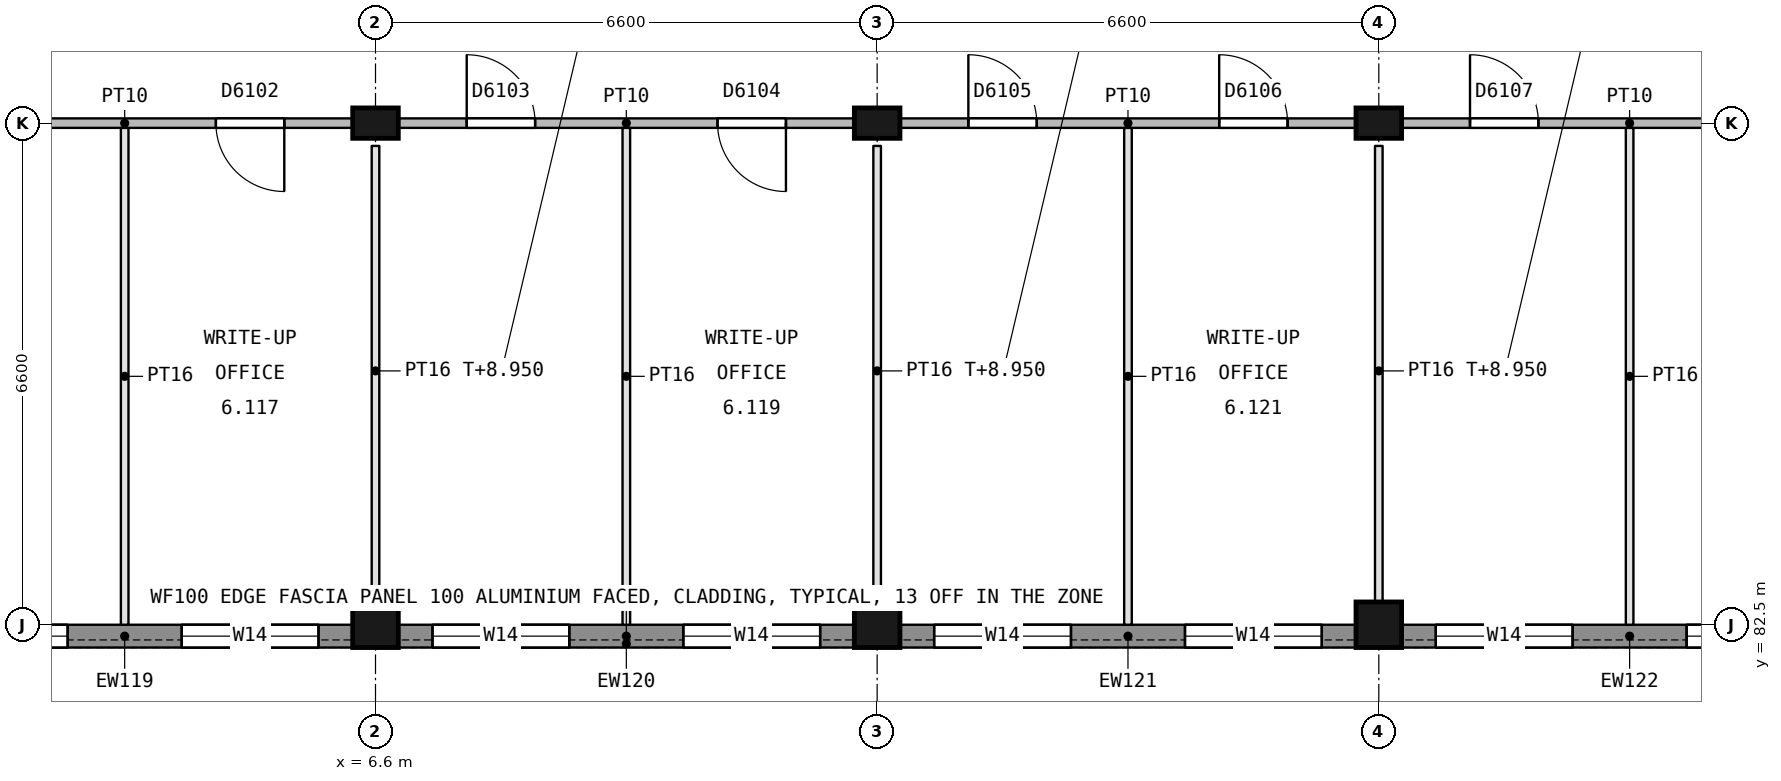
"""IFC4 building model, lengths in metres.
Left out: names, types, materials, properties, quantities, classifications, styles, units other than length and angle.
Written with IfcOpenShell. Run it as: python <this file> out.ifc"""

import sys

from ifc_helpers import new_model, si_unit, direction, frame, frame_2d, origin, origin_2d, place, context, subcontext, project, spatial, rectangle, extrude, element, fill, save


model = new_model("IFC4")
c1 = context("Model", 3, precision=1e-05, world=origin(), true_north=direction((0.0, 1.0)))
c2 = subcontext(c1, "Body", "Model", "MODEL_VIEW")
j1 = project(units=[si_unit("LENGTHUNIT", "METRE"), si_unit("PLANEANGLEUNIT", "RADIAN")], contexts=[c1])
p1 = place(None, origin())
s1 = spatial("IfcSite", under=j1, at=p1, CompositionType="ELEMENT")
p2 = place(p1, origin())
s2 = spatial("IfcBuilding", under=s1, at=p2, CompositionType="ELEMENT")
p3 = place(p2, frame((0.0, 0.0, 5.4)))
s3 = spatial("IfcBuildingStorey", under=s2, at=p3, CompositionType="ELEMENT", Elevation=5.4)
p4 = place(p3, frame((6.6, 82.5, 0.0), z_axis=(0.0, 0.0, 1.0), x_axis=(1.0, 0.0, 0.0)))
e1 = element("IfcColumn", 1, at=p4, inside=s3, PredefinedType="COLUMN", context=c2, shape_type="SweptSolid", body=[
    extrude(rectangle(XDim=0.6, YDim=0.6, at=origin_2d()), origin(), (0.0, 0.0, 1.0), 4.5),
])
p5 = place(p3, frame((6.6, 89.1, 0.0), z_axis=(0.0, 0.0, 1.0), x_axis=(1.0, 0.0, 0.0)))
e2 = element("IfcColumn", 2, at=p5, inside=s3, PredefinedType="COLUMN", context=c2, shape_type="SweptSolid", body=[
    extrude(rectangle(XDim=0.6, YDim=0.4, at=origin_2d()), origin(), (0.0, 0.0, 1.0), 4.5),
])
p6 = place(p3, frame((13.2, 82.5, 0.0), z_axis=(0.0, 0.0, 1.0), x_axis=(1.0, 0.0, 0.0)))
e3 = element("IfcColumn", 3, at=p6, inside=s3, PredefinedType="COLUMN", context=c2, shape_type="SweptSolid", body=[
    extrude(rectangle(XDim=0.6, YDim=0.6, at=origin_2d()), origin(), (0.0, 0.0, 1.0), 4.5),
])
p7 = place(p3, frame((13.2, 89.1, 0.0), z_axis=(0.0, 0.0, 1.0), x_axis=(1.0, 0.0, 0.0)))
e4 = element("IfcColumn", 4, at=p7, inside=s3, PredefinedType="COLUMN", context=c2, shape_type="SweptSolid", body=[
    extrude(rectangle(XDim=0.6, YDim=0.4, at=origin_2d()), origin(), (0.0, 0.0, 1.0), 4.5),
])
p8 = place(p3, frame((19.8, 82.5, 0.0), z_axis=(0.0, 0.0, 1.0), x_axis=(1.0, 0.0, 0.0)))
e5 = element("IfcColumn", 5, at=p8, inside=s3, PredefinedType="COLUMN", context=c2, shape_type="SweptSolid", body=[
    extrude(rectangle(XDim=0.6, YDim=0.6, at=origin_2d()), origin(), (0.0, 0.0, 1.0), 4.5),
])
p9 = place(p3, frame((19.8, 89.1, 0.0), z_axis=(0.0, 0.0, 1.0), x_axis=(1.0, 0.0, 0.0)))
e6 = element("IfcColumn", 6, at=p9, inside=s3, PredefinedType="COLUMN", context=c2, shape_type="SweptSolid", body=[
    extrude(rectangle(XDim=0.6, YDim=0.4, at=origin_2d()), origin(), (0.0, 0.0, 1.0), 4.5),
])
p10 = place(p3, frame((6.3, 82.35, 0.0), z_axis=(0.0, 0.0, 1.0), x_axis=(-1.0, 0.0, 0.0)))
e7 = element("IfcWall", 7, at=p10, inside=s3, PredefinedType="STANDARD", context=c2, shape_type="SweptSolid", body=[
    extrude(rectangle(XDim=6.0, YDim=0.3, at=frame_2d((3.0, 0.0))), origin(), (0.0, 0.0, 1.0), 3.65),
])
p11 = place(p10, frame((3.75, 0.0, 0.9)))
e8 = element("IfcOpeningElement", 8, at=p11, cuts=e7, PredefinedType="OPENING", context=c2, shape_type="SweptSolid", body=[
    extrude(rectangle(XDim=1.8, YDim=1.5, at=frame_2d((0.9, 0.75))), frame((0.0, 0.16, 0.0), z_axis=(0.0, -1.0, 0.0), x_axis=(1.0, 0.0, 0.0)), (0.0, 0.0, 1.0), 0.32),
])
p12 = place(p10, frame((0.45, 0.0, 0.9)))
e9 = element("IfcOpeningElement", 9, at=p12, cuts=e7, PredefinedType="OPENING", context=c2, shape_type="SweptSolid", body=[
    extrude(rectangle(XDim=1.8, YDim=1.5, at=frame_2d((0.9, 0.75))), frame((0.0, 0.16, 0.0), z_axis=(0.0, -1.0, 0.0), x_axis=(1.0, 0.0, 0.0)), (0.0, 0.0, 1.0), 0.32),
])
p13 = place(p3, frame((12.9, 82.35, 0.0), z_axis=(0.0, 0.0, 1.0), x_axis=(-1.0, 0.0, 0.0)))
e10 = element("IfcWall", 10, at=p13, inside=s3, PredefinedType="STANDARD", context=c2, shape_type="SweptSolid", body=[
    extrude(rectangle(XDim=6.0, YDim=0.3, at=frame_2d((3.0, 0.0))), origin(), (0.0, 0.0, 1.0), 3.65),
])
p14 = place(p13, frame((3.75, 0.0, 0.9)))
e11 = element("IfcOpeningElement", 11, at=p14, cuts=e10, PredefinedType="OPENING", context=c2, shape_type="SweptSolid", body=[
    extrude(rectangle(XDim=1.8, YDim=1.5, at=frame_2d((0.9, 0.75))), frame((0.0, 0.16, 0.0), z_axis=(0.0, -1.0, 0.0), x_axis=(1.0, 0.0, 0.0)), (0.0, 0.0, 1.0), 0.32),
])
p15 = place(p13, frame((0.45, 0.0, 0.9)))
e12 = element("IfcOpeningElement", 12, at=p15, cuts=e10, PredefinedType="OPENING", context=c2, shape_type="SweptSolid", body=[
    extrude(rectangle(XDim=1.8, YDim=1.5, at=frame_2d((0.9, 0.75))), frame((0.0, 0.16, 0.0), z_axis=(0.0, -1.0, 0.0), x_axis=(1.0, 0.0, 0.0)), (0.0, 0.0, 1.0), 0.32),
])
p16 = place(p3, frame((19.5, 82.35, 0.0), z_axis=(0.0, 0.0, 1.0), x_axis=(-1.0, 0.0, 0.0)))
e13 = element("IfcWall", 13, at=p16, inside=s3, PredefinedType="STANDARD", context=c2, shape_type="SweptSolid", body=[
    extrude(rectangle(XDim=6.0, YDim=0.3, at=frame_2d((3.0, 0.0))), origin(), (0.0, 0.0, 1.0), 3.65),
])
p17 = place(p16, frame((3.75, 0.0, 0.9)))
e14 = element("IfcOpeningElement", 14, at=p17, cuts=e13, PredefinedType="OPENING", context=c2, shape_type="SweptSolid", body=[
    extrude(rectangle(XDim=1.8, YDim=1.5, at=frame_2d((0.9, 0.75))), frame((0.0, 0.16, 0.0), z_axis=(0.0, -1.0, 0.0), x_axis=(1.0, 0.0, 0.0)), (0.0, 0.0, 1.0), 0.32),
])
p18 = place(p16, frame((0.45, 0.0, 0.9)))
e15 = element("IfcOpeningElement", 15, at=p18, cuts=e13, PredefinedType="OPENING", context=c2, shape_type="SweptSolid", body=[
    extrude(rectangle(XDim=1.8, YDim=1.5, at=frame_2d((0.9, 0.75))), frame((0.0, 0.16, 0.0), z_axis=(0.0, -1.0, 0.0), x_axis=(1.0, 0.0, 0.0)), (0.0, 0.0, 1.0), 0.32),
])
p19 = place(p3, frame((26.1, 82.35, 0.0), z_axis=(0.0, 0.0, 1.0), x_axis=(-1.0, 0.0, 0.0)))
e16 = element("IfcWall", 16, at=p19, inside=s3, PredefinedType="STANDARD", context=c2, shape_type="SweptSolid", body=[
    extrude(rectangle(XDim=6.0, YDim=0.3, at=frame_2d((3.0, 0.0))), origin(), (0.0, 0.0, 1.0), 3.65),
])
p20 = place(p19, frame((3.75, 0.0, 0.9)))
e17 = element("IfcOpeningElement", 17, at=p20, cuts=e16, PredefinedType="OPENING", context=c2, shape_type="SweptSolid", body=[
    extrude(rectangle(XDim=1.8, YDim=1.5, at=frame_2d((0.9, 0.75))), frame((0.0, 0.16, 0.0), z_axis=(0.0, -1.0, 0.0), x_axis=(1.0, 0.0, 0.0)), (0.0, 0.0, 1.0), 0.32),
])
p21 = place(p19, frame((0.45, 0.0, 0.9)))
e18 = element("IfcOpeningElement", 18, at=p21, cuts=e16, PredefinedType="OPENING", context=c2, shape_type="SweptSolid", body=[
    extrude(rectangle(XDim=1.8, YDim=1.5, at=frame_2d((0.9, 0.75))), frame((0.0, 0.16, 0.0), z_axis=(0.0, -1.0, 0.0), x_axis=(1.0, 0.0, 0.0)), (0.0, 0.0, 1.0), 0.32),
])
p22 = place(p3, frame((6.3, 89.1, 0.0), z_axis=(0.0, 0.0, 1.0), x_axis=(-1.0, 0.0, 0.0)))
e19 = element("IfcWall", 19, at=p22, inside=s3, PredefinedType="PARTITIONING", context=c2, shape_type="SweptSolid", body=[
    extrude(rectangle(XDim=6.0, YDim=0.125, at=frame_2d((3.0, 0.0))), origin(), (0.0, 0.0, 1.0), 3.65),
])
p23 = place(p22, frame((4.2, 0.0, 0.0)))
e20 = element("IfcOpeningElement", 20, at=p23, cuts=e19, PredefinedType="OPENING", context=c2, shape_type="SweptSolid", body=[
    extrude(rectangle(XDim=0.9, YDim=2.1, at=frame_2d((0.45, 1.05))), frame((0.0, 0.073, 0.0), z_axis=(0.0, -1.0, 0.0), x_axis=(1.0, 0.0, 0.0)), (0.0, 0.0, 1.0), 0.145),
])
p24 = place(p22, frame((0.9, 0.0, 0.0)))
e21 = element("IfcOpeningElement", 21, at=p24, cuts=e19, PredefinedType="OPENING", context=c2, shape_type="SweptSolid", body=[
    extrude(rectangle(XDim=0.9, YDim=2.1, at=frame_2d((0.45, 1.05))), frame((0.0, 0.073, 0.0), z_axis=(0.0, -1.0, 0.0), x_axis=(1.0, 0.0, 0.0)), (0.0, 0.0, 1.0), 0.145),
])
p25 = place(p3, frame((12.9, 89.1, 0.0), z_axis=(0.0, 0.0, 1.0), x_axis=(-1.0, 0.0, 0.0)))
e22 = element("IfcWall", 22, at=p25, inside=s3, PredefinedType="PARTITIONING", context=c2, shape_type="SweptSolid", body=[
    extrude(rectangle(XDim=6.0, YDim=0.125, at=frame_2d((3.0, 0.0))), origin(), (0.0, 0.0, 1.0), 3.65),
])
p26 = place(p25, frame((4.2, 0.0, 0.0)))
e23 = element("IfcOpeningElement", 23, at=p26, cuts=e22, PredefinedType="OPENING", context=c2, shape_type="SweptSolid", body=[
    extrude(rectangle(XDim=0.9, YDim=2.1, at=frame_2d((0.45, 1.05))), frame((0.0, 0.073, 0.0), z_axis=(0.0, -1.0, 0.0), x_axis=(1.0, 0.0, 0.0)), (0.0, 0.0, 1.0), 0.145),
])
p27 = place(p25, frame((0.9, 0.0, 0.0)))
e24 = element("IfcOpeningElement", 24, at=p27, cuts=e22, PredefinedType="OPENING", context=c2, shape_type="SweptSolid", body=[
    extrude(rectangle(XDim=0.9, YDim=2.1, at=frame_2d((0.45, 1.05))), frame((0.0, 0.073, 0.0), z_axis=(0.0, -1.0, 0.0), x_axis=(1.0, 0.0, 0.0)), (0.0, 0.0, 1.0), 0.145),
])
p28 = place(p3, frame((19.5, 89.1, 0.0), z_axis=(0.0, 0.0, 1.0), x_axis=(-1.0, 0.0, 0.0)))
e25 = element("IfcWall", 25, at=p28, inside=s3, PredefinedType="PARTITIONING", context=c2, shape_type="SweptSolid", body=[
    extrude(rectangle(XDim=6.0, YDim=0.125, at=frame_2d((3.0, 0.0))), origin(), (0.0, 0.0, 1.0), 3.65),
])
p29 = place(p28, frame((4.2, 0.0, 0.0)))
e26 = element("IfcOpeningElement", 26, at=p29, cuts=e25, PredefinedType="OPENING", context=c2, shape_type="SweptSolid", body=[
    extrude(rectangle(XDim=0.9, YDim=2.1, at=frame_2d((0.45, 1.05))), frame((0.0, 0.073, 0.0), z_axis=(0.0, -1.0, 0.0), x_axis=(1.0, 0.0, 0.0)), (0.0, 0.0, 1.0), 0.145),
])
p30 = place(p28, frame((0.9, 0.0, 0.0)))
e27 = element("IfcOpeningElement", 27, at=p30, cuts=e25, PredefinedType="OPENING", context=c2, shape_type="SweptSolid", body=[
    extrude(rectangle(XDim=0.9, YDim=2.1, at=frame_2d((0.45, 1.05))), frame((0.0, 0.073, 0.0), z_axis=(0.0, -1.0, 0.0), x_axis=(1.0, 0.0, 0.0)), (0.0, 0.0, 1.0), 0.145),
])
p31 = place(p3, frame((26.1, 89.1, 0.0), z_axis=(0.0, 0.0, 1.0), x_axis=(-1.0, 0.0, 0.0)))
e28 = element("IfcWall", 28, at=p31, inside=s3, PredefinedType="PARTITIONING", context=c2, shape_type="SweptSolid", body=[
    extrude(rectangle(XDim=6.0, YDim=0.125, at=frame_2d((3.0, 0.0))), origin(), (0.0, 0.0, 1.0), 3.65),
])
p32 = place(p31, frame((4.2, 0.0, 0.0)))
e29 = element("IfcOpeningElement", 29, at=p32, cuts=e28, PredefinedType="OPENING", context=c2, shape_type="SweptSolid", body=[
    extrude(rectangle(XDim=0.9, YDim=2.1, at=frame_2d((0.45, 1.05))), frame((0.0, 0.073, 0.0), z_axis=(0.0, -1.0, 0.0), x_axis=(1.0, 0.0, 0.0)), (0.0, 0.0, 1.0), 0.145),
])
p33 = place(p31, frame((0.9, 0.0, 0.0)))
e30 = element("IfcOpeningElement", 30, at=p33, cuts=e28, PredefinedType="OPENING", context=c2, shape_type="SweptSolid", body=[
    extrude(rectangle(XDim=0.9, YDim=2.1, at=frame_2d((0.45, 1.05))), frame((0.0, 0.073, 0.0), z_axis=(0.0, -1.0, 0.0), x_axis=(1.0, 0.0, 0.0)), (0.0, 0.0, 1.0), 0.145),
])
p34 = place(p3, frame((3.3, 82.5, 0.0), z_axis=(0.0, 0.0, 1.0), x_axis=(0.0, 1.0, 0.0)))
e31 = element("IfcWall", 31, at=p34, inside=s3, PredefinedType="PARTITIONING", context=c2, shape_type="SweptSolid", body=[
    extrude(rectangle(XDim=6.537, YDim=0.1, at=frame_2d((3.269, 0.0))), origin(), (0.0, 0.0, 1.0), 3.65),
])
p35 = place(p3, frame((6.6, 82.8, 0.0), z_axis=(0.0, 0.0, 1.0), x_axis=(0.0, 1.0, 0.0)))
e32 = element("IfcWall", 32, at=p35, inside=s3, PredefinedType="PARTITIONING", context=c2, shape_type="SweptSolid", body=[
    extrude(rectangle(XDim=6.0, YDim=0.1, at=frame_2d((3.0, 0.0))), origin(), (0.0, 0.0, 1.0), 3.55),
])
p36 = place(p3, frame((9.9, 82.5, 0.0), z_axis=(0.0, 0.0, 1.0), x_axis=(0.0, 1.0, 0.0)))
e33 = element("IfcWall", 33, at=p36, inside=s3, PredefinedType="PARTITIONING", context=c2, shape_type="SweptSolid", body=[
    extrude(rectangle(XDim=6.537, YDim=0.1, at=frame_2d((3.269, 0.0))), origin(), (0.0, 0.0, 1.0), 3.65),
])
p37 = place(p3, frame((13.2, 82.8, 0.0), z_axis=(0.0, 0.0, 1.0), x_axis=(0.0, 1.0, 0.0)))
e34 = element("IfcWall", 34, at=p37, inside=s3, PredefinedType="PARTITIONING", context=c2, shape_type="SweptSolid", body=[
    extrude(rectangle(XDim=6.0, YDim=0.1, at=frame_2d((3.0, 0.0))), origin(), (0.0, 0.0, 1.0), 3.55),
])
p38 = place(p3, frame((16.5, 82.5, 0.0), z_axis=(0.0, 0.0, 1.0), x_axis=(0.0, 1.0, 0.0)))
e35 = element("IfcWall", 35, at=p38, inside=s3, PredefinedType="PARTITIONING", context=c2, shape_type="SweptSolid", body=[
    extrude(rectangle(XDim=6.537, YDim=0.1, at=frame_2d((3.269, 0.0))), origin(), (0.0, 0.0, 1.0), 3.65),
])
p39 = place(p3, frame((19.8, 82.8, 0.0), z_axis=(0.0, 0.0, 1.0), x_axis=(0.0, 1.0, 0.0)))
e36 = element("IfcWall", 36, at=p39, inside=s3, PredefinedType="PARTITIONING", context=c2, shape_type="SweptSolid", body=[
    extrude(rectangle(XDim=6.0, YDim=0.1, at=frame_2d((3.0, 0.0))), origin(), (0.0, 0.0, 1.0), 3.55),
])
p40 = place(p3, frame((23.1, 82.5, 0.0), z_axis=(0.0, 0.0, 1.0), x_axis=(0.0, 1.0, 0.0)))
e37 = element("IfcWall", 37, at=p40, inside=s3, PredefinedType="PARTITIONING", context=c2, shape_type="SweptSolid", body=[
    extrude(rectangle(XDim=6.537, YDim=0.1, at=frame_2d((3.269, 0.0))), origin(), (0.0, 0.0, 1.0), 3.65),
])
p41 = place(p11, origin())
e38 = element("IfcWindow", 38, at=p41, inside=s3, PartitioningType="SINGLE_PANEL", PredefinedType="WINDOW", context=c2, shape_type="SweptSolid", body=[
    extrude(rectangle(XDim=1.8, YDim=1.5, at=frame_2d((0.9, 0.75))), frame((0.0, 0.03, 0.0), z_axis=(0.0, -1.0, 0.0), x_axis=(1.0, 0.0, 0.0)), (0.0, 0.0, 1.0), 0.06),
])
fill(e8, e38)
p42 = place(p12, origin())
e39 = element("IfcWindow", 39, at=p42, inside=s3, PartitioningType="SINGLE_PANEL", PredefinedType="WINDOW", context=c2, shape_type="SweptSolid", body=[
    extrude(rectangle(XDim=1.8, YDim=1.5, at=frame_2d((0.9, 0.75))), frame((0.0, 0.03, 0.0), z_axis=(0.0, -1.0, 0.0), x_axis=(1.0, 0.0, 0.0)), (0.0, 0.0, 1.0), 0.06),
])
fill(e9, e39)
p43 = place(p14, origin())
e40 = element("IfcWindow", 40, at=p43, inside=s3, PartitioningType="SINGLE_PANEL", PredefinedType="WINDOW", context=c2, shape_type="SweptSolid", body=[
    extrude(rectangle(XDim=1.8, YDim=1.5, at=frame_2d((0.9, 0.75))), frame((0.0, 0.03, 0.0), z_axis=(0.0, -1.0, 0.0), x_axis=(1.0, 0.0, 0.0)), (0.0, 0.0, 1.0), 0.06),
])
fill(e11, e40)
p44 = place(p15, origin())
e41 = element("IfcWindow", 41, at=p44, inside=s3, PartitioningType="SINGLE_PANEL", PredefinedType="WINDOW", context=c2, shape_type="SweptSolid", body=[
    extrude(rectangle(XDim=1.8, YDim=1.5, at=frame_2d((0.9, 0.75))), frame((0.0, 0.03, 0.0), z_axis=(0.0, -1.0, 0.0), x_axis=(1.0, 0.0, 0.0)), (0.0, 0.0, 1.0), 0.06),
])
fill(e12, e41)
p45 = place(p17, origin())
e42 = element("IfcWindow", 42, at=p45, inside=s3, PartitioningType="SINGLE_PANEL", PredefinedType="WINDOW", context=c2, shape_type="SweptSolid", body=[
    extrude(rectangle(XDim=1.8, YDim=1.5, at=frame_2d((0.9, 0.75))), frame((0.0, 0.03, 0.0), z_axis=(0.0, -1.0, 0.0), x_axis=(1.0, 0.0, 0.0)), (0.0, 0.0, 1.0), 0.06),
])
fill(e14, e42)
p46 = place(p18, origin())
e43 = element("IfcWindow", 43, at=p46, inside=s3, PartitioningType="SINGLE_PANEL", PredefinedType="WINDOW", context=c2, shape_type="SweptSolid", body=[
    extrude(rectangle(XDim=1.8, YDim=1.5, at=frame_2d((0.9, 0.75))), frame((0.0, 0.03, 0.0), z_axis=(0.0, -1.0, 0.0), x_axis=(1.0, 0.0, 0.0)), (0.0, 0.0, 1.0), 0.06),
])
fill(e15, e43)
p47 = place(p20, origin())
e44 = element("IfcWindow", 44, at=p47, inside=s3, PartitioningType="SINGLE_PANEL", PredefinedType="WINDOW", context=c2, shape_type="SweptSolid", body=[
    extrude(rectangle(XDim=1.8, YDim=1.5, at=frame_2d((0.9, 0.75))), frame((0.0, 0.03, 0.0), z_axis=(0.0, -1.0, 0.0), x_axis=(1.0, 0.0, 0.0)), (0.0, 0.0, 1.0), 0.06),
])
fill(e17, e44)
p48 = place(p21, origin())
e45 = element("IfcWindow", 45, at=p48, inside=s3, PartitioningType="SINGLE_PANEL", PredefinedType="WINDOW", context=c2, shape_type="SweptSolid", body=[
    extrude(rectangle(XDim=1.8, YDim=1.5, at=frame_2d((0.9, 0.75))), frame((0.0, 0.03, 0.0), z_axis=(0.0, -1.0, 0.0), x_axis=(1.0, 0.0, 0.0)), (0.0, 0.0, 1.0), 0.06),
])
fill(e18, e45)
p49 = place(p24, origin())
e46 = element("IfcDoor", 46, at=p49, inside=s3, OperationType="SINGLE_SWING_LEFT", PredefinedType="DOOR", context=c2, shape_type="SweptSolid", body=[
    extrude(rectangle(XDim=0.9, YDim=2.1, at=frame_2d((0.45, 1.05))), frame((0.0, 0.025, 0.0), z_axis=(0.0, -1.0, 0.0), x_axis=(1.0, 0.0, 0.0)), (0.0, 0.0, 1.0), 0.05),
])
fill(e21, e46)
p50 = place(p26, origin())
e47 = element("IfcDoor", 47, at=p50, inside=s3, OperationType="SINGLE_SWING_RIGHT", PredefinedType="DOOR", context=c2, shape_type="SweptSolid", body=[
    extrude(rectangle(XDim=0.9, YDim=2.1, at=frame_2d((0.45, 1.05))), frame((0.0, 0.025, 0.0), z_axis=(0.0, -1.0, 0.0), x_axis=(1.0, 0.0, 0.0)), (0.0, 0.0, 1.0), 0.05),
])
fill(e23, e47)
p51 = place(p27, origin())
e48 = element("IfcDoor", 48, at=p51, inside=s3, OperationType="SINGLE_SWING_LEFT", PredefinedType="DOOR", context=c2, shape_type="SweptSolid", body=[
    extrude(rectangle(XDim=0.9, YDim=2.1, at=frame_2d((0.45, 1.05))), frame((0.0, 0.025, 0.0), z_axis=(0.0, -1.0, 0.0), x_axis=(1.0, 0.0, 0.0)), (0.0, 0.0, 1.0), 0.05),
])
fill(e24, e48)
p52 = place(p29, origin())
e49 = element("IfcDoor", 49, at=p52, inside=s3, OperationType="SINGLE_SWING_RIGHT", PredefinedType="DOOR", context=c2, shape_type="SweptSolid", body=[
    extrude(rectangle(XDim=0.9, YDim=2.1, at=frame_2d((0.45, 1.05))), frame((0.0, 0.025, 0.0), z_axis=(0.0, -1.0, 0.0), x_axis=(1.0, 0.0, 0.0)), (0.0, 0.0, 1.0), 0.05),
])
fill(e26, e49)
p53 = place(p30, origin())
e50 = element("IfcDoor", 50, at=p53, inside=s3, OperationType="SINGLE_SWING_RIGHT", PredefinedType="DOOR", context=c2, shape_type="SweptSolid", body=[
    extrude(rectangle(XDim=0.9, YDim=2.1, at=frame_2d((0.45, 1.05))), frame((0.0, 0.025, 0.0), z_axis=(0.0, -1.0, 0.0), x_axis=(1.0, 0.0, 0.0)), (0.0, 0.0, 1.0), 0.05),
])
fill(e27, e50)
p54 = place(p32, origin())
e51 = element("IfcDoor", 51, at=p54, inside=s3, OperationType="SINGLE_SWING_RIGHT", PredefinedType="DOOR", context=c2, shape_type="SweptSolid", body=[
    extrude(rectangle(XDim=0.9, YDim=2.1, at=frame_2d((0.45, 1.05))), frame((0.0, 0.025, 0.0), z_axis=(0.0, -1.0, 0.0), x_axis=(1.0, 0.0, 0.0)), (0.0, 0.0, 1.0), 0.05),
])
fill(e29, e51)
save(model, sys.argv[1])
